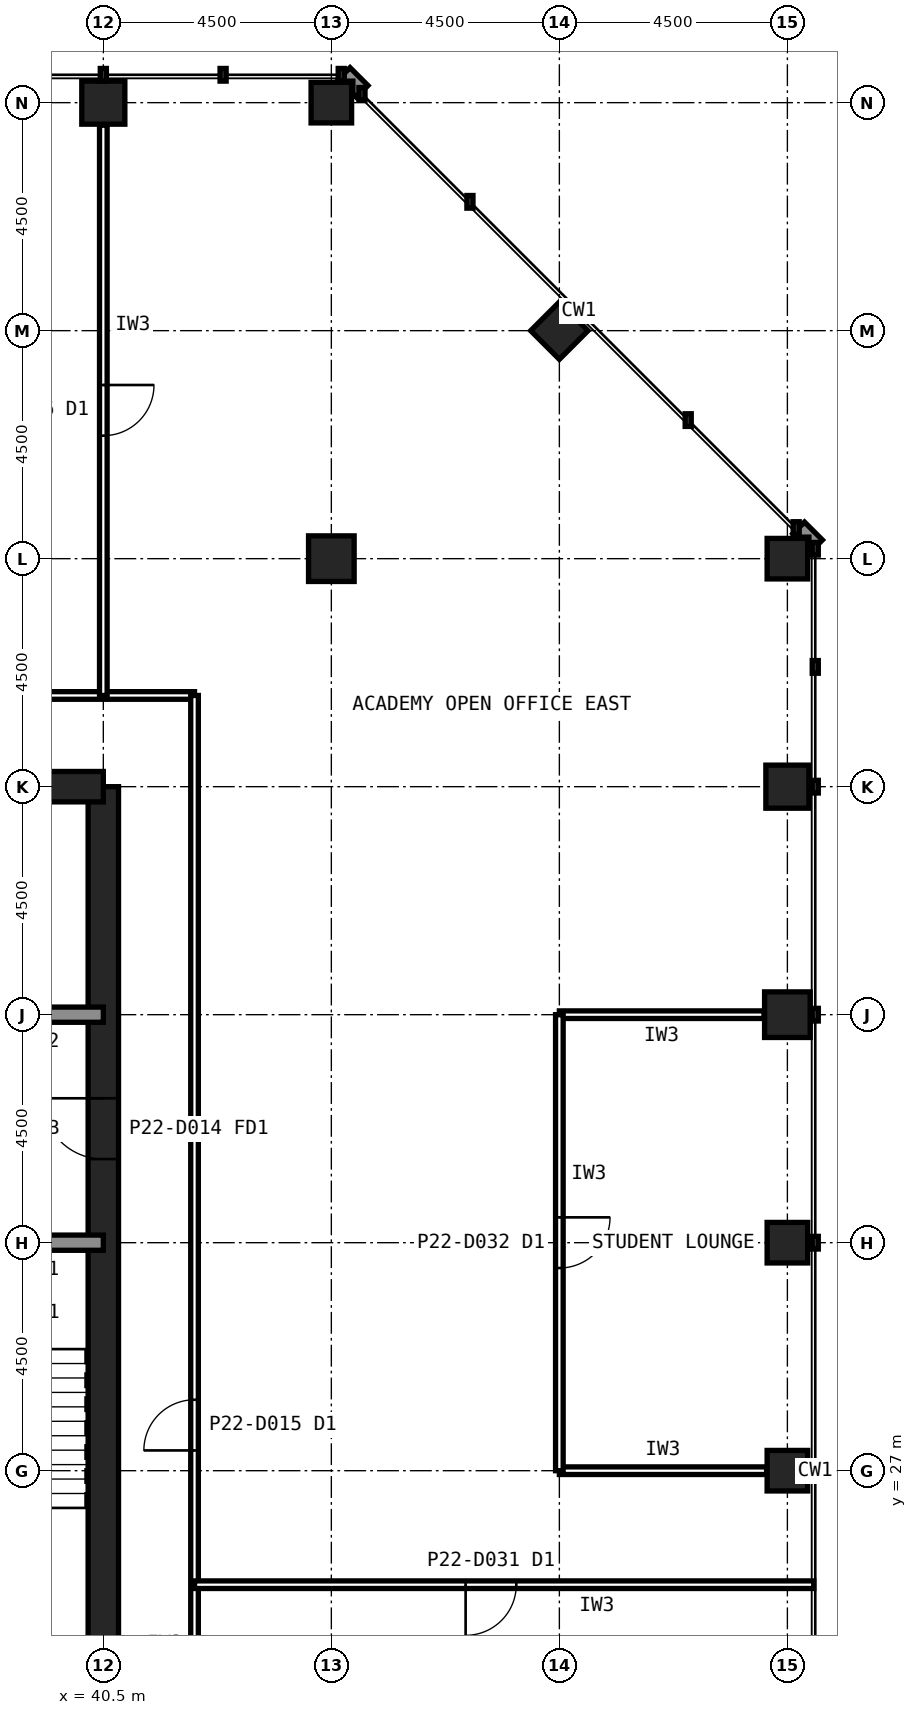
"""IFC4 building model, lengths in metres.
Left out: names, types, materials, properties, quantities, classifications, styles, units other than length and angle.
Written with IfcOpenShell. Run it as: python <this file> out.ifc"""

import sys

from ifc_helpers import new_model, si_unit, direction, frame, frame_2d, origin, origin_2d, place, context, subcontext, project, spatial, rectangle, hollow_rectangle, extrude, element, fill, save


model = new_model("IFC4")
c1 = context("Model", 3, precision=1e-05, world=origin(), true_north=direction((0.0, 1.0)))
c2 = subcontext(c1, "Body", "Model", "MODEL_VIEW")
j1 = project(units=[si_unit("LENGTHUNIT", "METRE"), si_unit("PLANEANGLEUNIT", "RADIAN")], contexts=[c1])
p1 = place(None, origin())
s1 = spatial("IfcSite", under=j1, at=p1, CompositionType="ELEMENT")
p2 = place(p1, origin())
s2 = spatial("IfcBuilding", under=s1, at=p2, CompositionType="ELEMENT")
p3 = place(p2, frame((0.0, 0.0, 96.2)))
s3 = spatial("IfcBuildingStorey", under=s2, at=p3, CompositionType="ELEMENT", Elevation=96.2)
for number, where, z_axis, x_axis in (
    (1, (54.0, 27.0, 0.0), (0.0, 0.0, 1.0), (1.0, 0.0, 0.0)),
    (2, (54.0, 31.5, 0.0), (0.0, 0.0, 1.0), (1.0, 0.0, 0.0)),
):
    element("IfcColumn", number, at=place(p3, frame(where, z_axis=z_axis, x_axis=x_axis)), inside=s3, PredefinedType="COLUMN", context=c2, shape_type="SweptSolid", body=[
        extrude(hollow_rectangle(XDim=0.8, YDim=0.8, WallThickness=0.045, at=origin_2d()), origin(), (0.0, 0.0, 1.0), 4.2),
    ])
p4 = place(p3, frame((54.0, 36.0, 0.0), z_axis=(0.0, 0.0, 1.0), x_axis=(1.0, 0.0, 0.0)))
e3 = element("IfcColumn", 3, at=p4, inside=s3, PredefinedType="COLUMN", context=c2, shape_type="SweptSolid", body=[
    extrude(hollow_rectangle(XDim=0.9, YDim=0.9, WallThickness=0.063, at=origin_2d()), origin(), (0.0, 0.0, 1.0), 4.2),
])
p5 = place(p3, frame((54.0, 40.5, 0.0), z_axis=(0.0, 0.0, 1.0), x_axis=(1.0, 0.0, 0.0)))
e4 = element("IfcColumn", 4, at=p5, inside=s3, PredefinedType="COLUMN", context=c2, shape_type="SweptSolid", body=[
    extrude(hollow_rectangle(XDim=0.85, YDim=0.85, WallThickness=0.05, at=origin_2d()), origin(), (0.0, 0.0, 1.0), 4.2),
])
for number, where, z_axis, x_axis in (
    (5, (54.0, 45.0, 0.0), (0.0, 0.0, 1.0), (1.0, 0.0, 0.0)),
    (6, (45.0, 54.0, 0.0), (0.0, 0.0, 1.0), (1.0, 0.0, 0.0)),
):
    element("IfcColumn", number, at=place(p3, frame(where, z_axis=z_axis, x_axis=x_axis)), inside=s3, PredefinedType="COLUMN", context=c2, shape_type="SweptSolid", body=[
        extrude(hollow_rectangle(XDim=0.8, YDim=0.8, WallThickness=0.045, at=origin_2d()), origin(), (0.0, 0.0, 1.0), 4.2),
    ])
p6 = place(p3, frame((40.5, 54.0, 0.0), z_axis=(0.0, 0.0, 1.0), x_axis=(1.0, 0.0, 0.0)))
e7 = element("IfcColumn", 7, at=p6, inside=s3, PredefinedType="COLUMN", context=c2, shape_type="SweptSolid", body=[
    extrude(hollow_rectangle(XDim=0.85, YDim=0.85, WallThickness=0.05, at=origin_2d()), origin(), (0.0, 0.0, 1.0), 4.2),
])
p7 = place(p3, frame((49.5, 49.5, 0.0), z_axis=(0.0, 0.0, 1.0), x_axis=(0.707106781187, 0.707106781187, 0.0)))
e8 = element("IfcColumn", 8, at=p7, inside=s3, PredefinedType="COLUMN", context=c2, shape_type="SweptSolid", body=[
    extrude(hollow_rectangle(XDim=0.8, YDim=0.8, WallThickness=0.045, at=origin_2d()), origin(), (0.0, 0.0, 1.0), 4.2),
])
p8 = place(p3, frame((45.0, 45.0, 0.0), z_axis=(0.0, 0.0, 1.0), x_axis=(1.0, 0.0, 0.0)))
e9 = element("IfcColumn", 9, at=p8, inside=s3, PredefinedType="COLUMN", context=c2, shape_type="SweptSolid", body=[
    extrude(hollow_rectangle(XDim=0.9, YDim=0.9, WallThickness=0.063, at=origin_2d()), origin(), (0.0, 0.0, 1.0), 4.2),
])
p9 = place(p3, frame((40.5, 13.5, 0.0), z_axis=(0.0, 0.0, 1.0), x_axis=(0.0, 1.0, 0.0)))
e10 = element("IfcWall", 10, at=p9, inside=s3, PredefinedType="SHEAR", context=c2, shape_type="SweptSolid", body=[
    extrude(rectangle(XDim=27.0, YDim=0.6, at=frame_2d((13.5, 0.0))), origin(), (0.0, 0.0, 1.0), 4.2),
])
p10 = place(p9, frame((5.85, 0.0, 0.0)))
e11 = element("IfcOpeningElement", 11, at=p10, cuts=e10, PredefinedType="OPENING", context=c2, shape_type="SweptSolid", body=[
    extrude(rectangle(XDim=1.8, YDim=2.1, at=frame_2d((0.9, 1.05))), frame((0.0, 0.31, 0.0), z_axis=(0.0, -1.0, 0.0), x_axis=(1.0, 0.0, 0.0)), (0.0, 0.0, 1.0), 0.62),
])
p11 = place(p9, frame((19.65, 0.0, 0.0)))
e12 = element("IfcOpeningElement", 12, at=p11, cuts=e10, PredefinedType="OPENING", context=c2, shape_type="SweptSolid", body=[
    extrude(rectangle(XDim=1.2, YDim=2.1, at=frame_2d((0.6, 1.05))), frame((0.0, 0.31, 0.0), z_axis=(0.0, -1.0, 0.0), x_axis=(1.0, 0.0, 0.0)), (0.0, 0.0, 1.0), 0.62),
])
p12 = place(p3, frame((40.5, 40.5, 0.0), z_axis=(0.0, 0.0, 1.0), x_axis=(-1.0, 0.0, 0.0)))
e13 = element("IfcWall", 13, at=p12, inside=s3, PredefinedType="SHEAR", context=c2, shape_type="SweptSolid", body=[
    extrude(rectangle(XDim=27.0, YDim=0.6, at=frame_2d((13.5, 0.0))), origin(), (0.0, 0.0, 1.0), 4.2),
])
p13 = place(p3, frame((13.5, 36.0, 0.0), z_axis=(0.0, 0.0, 1.0), x_axis=(1.0, 0.0, 0.0)))
e14 = element("IfcWall", 14, at=p13, inside=s3, PredefinedType="SOLIDWALL", context=c2, shape_type="SweptSolid", body=[
    extrude(rectangle(XDim=27.0, YDim=0.3, at=frame_2d((13.5, 0.0))), origin(), (0.0, 0.0, 1.0), 4.04),
])
p14 = place(p13, frame((1.8, 0.0, 0.0)))
e15 = element("IfcOpeningElement", 15, at=p14, cuts=e14, PredefinedType="OPENING", context=c2, shape_type="SweptSolid", body=[
    extrude(rectangle(XDim=0.9, YDim=2.1, at=frame_2d((0.45, 1.05))), frame((0.0, 0.16, 0.0), z_axis=(0.0, -1.0, 0.0), x_axis=(1.0, 0.0, 0.0)), (0.0, 0.0, 1.0), 0.32),
])
p15 = place(p13, frame((24.1, 0.0, 0.0)))
e16 = element("IfcOpeningElement", 16, at=p15, cuts=e14, PredefinedType="OPENING", context=c2, shape_type="SweptSolid", body=[
    extrude(rectangle(XDim=1.3, YDim=2.2, at=frame_2d((0.65, 1.1))), frame((0.0, 0.16, 0.0), z_axis=(0.0, -1.0, 0.0), x_axis=(1.0, 0.0, 0.0)), (0.0, 0.0, 1.0), 0.32),
])
p16 = place(p3, frame((13.5, 31.5, 0.0), z_axis=(0.0, 0.0, 1.0), x_axis=(1.0, 0.0, 0.0)))
e17 = element("IfcWall", 17, at=p16, inside=s3, PredefinedType="SOLIDWALL", context=c2, shape_type="SweptSolid", body=[
    extrude(rectangle(XDim=27.0, YDim=0.3, at=frame_2d((13.5, 0.0))), origin(), (0.0, 0.0, 1.0), 4.04),
])
p17 = place(p16, frame((24.15, 0.0, 0.0)))
e18 = element("IfcOpeningElement", 18, at=p17, cuts=e17, PredefinedType="OPENING", context=c2, shape_type="SweptSolid", body=[
    extrude(rectangle(XDim=1.2, YDim=2.1, at=frame_2d((0.6, 1.05))), frame((0.0, 0.16, 0.0), z_axis=(0.0, -1.0, 0.0), x_axis=(1.0, 0.0, 0.0)), (0.0, 0.0, 1.0), 0.32),
])
p18 = place(p16, frame((15.3, 0.0, 0.0)))
e19 = element("IfcOpeningElement", 19, at=p18, cuts=e17, PredefinedType="OPENING", context=c2, shape_type="SweptSolid", body=[
    extrude(rectangle(XDim=0.9, YDim=2.1, at=frame_2d((0.45, 1.05))), frame((0.0, 0.16, 0.0), z_axis=(0.0, -1.0, 0.0), x_axis=(1.0, 0.0, 0.0)), (0.0, 0.0, 1.0), 0.32),
])
p19 = place(p16, frame((19.8, 0.0, 0.0)))
e20 = element("IfcOpeningElement", 20, at=p19, cuts=e17, PredefinedType="OPENING", context=c2, shape_type="SweptSolid", body=[
    extrude(rectangle(XDim=0.9, YDim=2.1, at=frame_2d((0.45, 1.05))), frame((0.0, 0.16, 0.0), z_axis=(0.0, -1.0, 0.0), x_axis=(1.0, 0.0, 0.0)), (0.0, 0.0, 1.0), 0.32),
])
p20 = place(p3, frame((42.3, 42.3, 0.0), z_axis=(0.0, 0.0, 1.0), x_axis=(-1.0, 0.0, 0.0)))
e21 = element("IfcWall", 21, at=p20, inside=s3, PredefinedType="PARTITIONING", context=c2, shape_type="SweptSolid", body=[
    extrude(rectangle(XDim=30.6, YDim=0.15, at=frame_2d((15.3, 0.0))), origin(), (0.0, 0.0, 1.0), 4.04),
])
p21 = place(p20, frame((14.8, 0.0, 0.0)))
e22 = element("IfcOpeningElement", 22, at=p21, cuts=e21, PredefinedType="OPENING", context=c2, shape_type="SweptSolid", body=[
    extrude(rectangle(XDim=1.0, YDim=2.1, at=frame_2d((0.5, 1.05))), frame((0.0, 0.085, 0.0), z_axis=(0.0, -1.0, 0.0), x_axis=(1.0, 0.0, 0.0)), (0.0, 0.0, 1.0), 0.17),
])
p22 = place(p3, frame((42.3, 13.5, 0.0), z_axis=(0.0, 0.0, 1.0), x_axis=(0.0, 1.0, 0.0)))
e23 = element("IfcWall", 23, at=p22, inside=s3, PredefinedType="PARTITIONING", context=c2, shape_type="SweptSolid", body=[
    extrude(rectangle(XDim=28.8, YDim=0.15, at=frame_2d((14.4, 0.0))), origin(), (0.0, 0.0, 1.0), 4.04),
])
p23 = place(p22, frame((13.9, 0.0, 0.0)))
e24 = element("IfcOpeningElement", 24, at=p23, cuts=e23, PredefinedType="OPENING", context=c2, shape_type="SweptSolid", body=[
    extrude(rectangle(XDim=1.0, YDim=2.1, at=frame_2d((0.5, 1.05))), frame((0.0, 0.085, 0.0), z_axis=(0.0, -1.0, 0.0), x_axis=(1.0, 0.0, 0.0)), (0.0, 0.0, 1.0), 0.17),
])
p24 = place(p3, frame((49.5, 27.0, 0.0), z_axis=(0.0, 0.0, 1.0), x_axis=(1.0, 0.0, 0.0)))
e25 = element("IfcWall", 25, at=p24, inside=s3, PredefinedType="PARTITIONING", context=c2, shape_type="SweptSolid", body=[
    extrude(rectangle(XDim=4.09, YDim=0.15, at=frame_2d((2.045, 0.0))), origin(), (0.0, 0.0, 1.0), 3.189),
])
p25 = place(p3, frame((53.54, 36.0, 0.0), z_axis=(0.0, 0.0, 1.0), x_axis=(-1.0, 0.0, 0.0)))
e26 = element("IfcWall", 26, at=p25, inside=s3, PredefinedType="PARTITIONING", context=c2, shape_type="SweptSolid", body=[
    extrude(rectangle(XDim=4.04, YDim=0.15, at=frame_2d((2.02, 0.0))), origin(), (0.0, 0.0, 1.0), 3.189),
])
p26 = place(p3, frame((49.5, 36.0, 0.0), z_axis=(0.0, 0.0, 1.0), x_axis=(0.0, -1.0, 0.0)))
e27 = element("IfcWall", 27, at=p26, inside=s3, PredefinedType="PARTITIONING", context=c2, shape_type="SweptSolid", body=[
    extrude(rectangle(XDim=9.0, YDim=0.15, at=frame_2d((4.5, 0.0))), origin(), (0.0, 0.0, 1.0), 4.04),
])
p27 = place(p26, frame((4.0, 0.0, 0.0)))
e28 = element("IfcOpeningElement", 28, at=p27, cuts=e27, PredefinedType="OPENING", context=c2, shape_type="SweptSolid", body=[
    extrude(rectangle(XDim=1.0, YDim=2.1, at=frame_2d((0.5, 1.05))), frame((0.0, 0.085, 0.0), z_axis=(0.0, -1.0, 0.0), x_axis=(1.0, 0.0, 0.0)), (0.0, 0.0, 1.0), 0.17),
])
p28 = place(p3, frame((40.5, 53.555, 0.0), z_axis=(0.0, 0.0, 1.0), x_axis=(0.0, -1.0, 0.0)))
e29 = element("IfcWall", 29, at=p28, inside=s3, PredefinedType="PARTITIONING", context=c2, shape_type="SweptSolid", body=[
    extrude(rectangle(XDim=11.255, YDim=0.15, at=frame_2d((5.627, 0.0))), origin(), (0.0, 0.0, 1.0), 3.189),
])
p29 = place(p28, frame((5.127, 0.0, 0.0)))
e30 = element("IfcOpeningElement", 30, at=p29, cuts=e29, PredefinedType="OPENING", context=c2, shape_type="SweptSolid", body=[
    extrude(rectangle(XDim=1.0, YDim=2.1, at=frame_2d((0.5, 1.05))), frame((0.0, 0.085, 0.0), z_axis=(0.0, -1.0, 0.0), x_axis=(1.0, 0.0, 0.0)), (0.0, 0.0, 1.0), 0.17),
])
p30 = place(p3, frame((54.52, 24.75, 0.0), z_axis=(0.0, 0.0, 1.0), x_axis=(-1.0, 0.0, 0.0)))
e31 = element("IfcWall", 31, at=p30, inside=s3, PredefinedType="PARTITIONING", context=c2, shape_type="SweptSolid", body=[
    extrude(rectangle(XDim=12.22, YDim=0.15, at=frame_2d((6.11, 0.0))), origin(), (0.0, 0.0, 1.0), 4.04),
])
p31 = place(p30, frame((5.87, 0.0, 0.0)))
e32 = element("IfcOpeningElement", 32, at=p31, cuts=e31, PredefinedType="OPENING", context=c2, shape_type="SweptSolid", body=[
    extrude(rectangle(XDim=1.0, YDim=2.1, at=frame_2d((0.5, 1.05))), frame((0.0, 0.085, 0.0), z_axis=(0.0, -1.0, 0.0), x_axis=(1.0, 0.0, 0.0)), (0.0, 0.0, 1.0), 0.17),
])
p32 = place(p11, origin())
e33 = element("IfcDoor", 33, at=p32, inside=s3, OperationType="SINGLE_SWING_RIGHT", PredefinedType="DOOR", context=c2, shape_type="SweptSolid", body=[
    extrude(rectangle(XDim=1.2, YDim=2.1, at=frame_2d((0.6, 1.05))), frame((0.0, 0.025, 0.0), z_axis=(0.0, -1.0, 0.0), x_axis=(1.0, 0.0, 0.0)), (0.0, 0.0, 1.0), 0.05),
])
fill(e12, e33)
p33 = place(p23, origin())
e34 = element("IfcDoor", 34, at=p33, inside=s3, OperationType="SINGLE_SWING_LEFT", PredefinedType="DOOR", context=c2, shape_type="SweptSolid", body=[
    extrude(rectangle(XDim=1.0, YDim=2.1, at=frame_2d((0.5, 1.05))), frame((0.0, 0.025, 0.0), z_axis=(0.0, -1.0, 0.0), x_axis=(1.0, 0.0, 0.0)), (0.0, 0.0, 1.0), 0.05),
])
fill(e24, e34)
p34 = place(p27, origin())
e35 = element("IfcDoor", 35, at=p34, inside=s3, OperationType="SINGLE_SWING_LEFT", PredefinedType="DOOR", context=c2, shape_type="SweptSolid", body=[
    extrude(rectangle(XDim=1.0, YDim=2.1, at=frame_2d((0.5, 1.05))), frame((0.0, 0.025, 0.0), z_axis=(0.0, -1.0, 0.0), x_axis=(1.0, 0.0, 0.0)), (0.0, 0.0, 1.0), 0.05),
])
fill(e28, e35)
p35 = place(p29, origin())
e36 = element("IfcDoor", 36, at=p35, inside=s3, OperationType="SINGLE_SWING_LEFT", PredefinedType="DOOR", context=c2, shape_type="SweptSolid", body=[
    extrude(rectangle(XDim=1.0, YDim=2.1, at=frame_2d((0.5, 1.05))), frame((0.0, 0.025, 0.0), z_axis=(0.0, -1.0, 0.0), x_axis=(1.0, 0.0, 0.0)), (0.0, 0.0, 1.0), 0.05),
])
fill(e30, e36)
p36 = place(p31, origin())
e37 = element("IfcDoor", 37, at=p36, inside=s3, OperationType="SINGLE_SWING_RIGHT", PredefinedType="DOOR", context=c2, shape_type="SweptSolid", body=[
    extrude(rectangle(XDim=1.0, YDim=2.1, at=frame_2d((0.5, 1.05))), frame((0.0, 0.025, 0.0), z_axis=(0.0, -1.0, 0.0), x_axis=(1.0, 0.0, 0.0)), (0.0, 0.0, 1.0), 0.05),
])
fill(e32, e37)
save(model, sys.argv[1])
